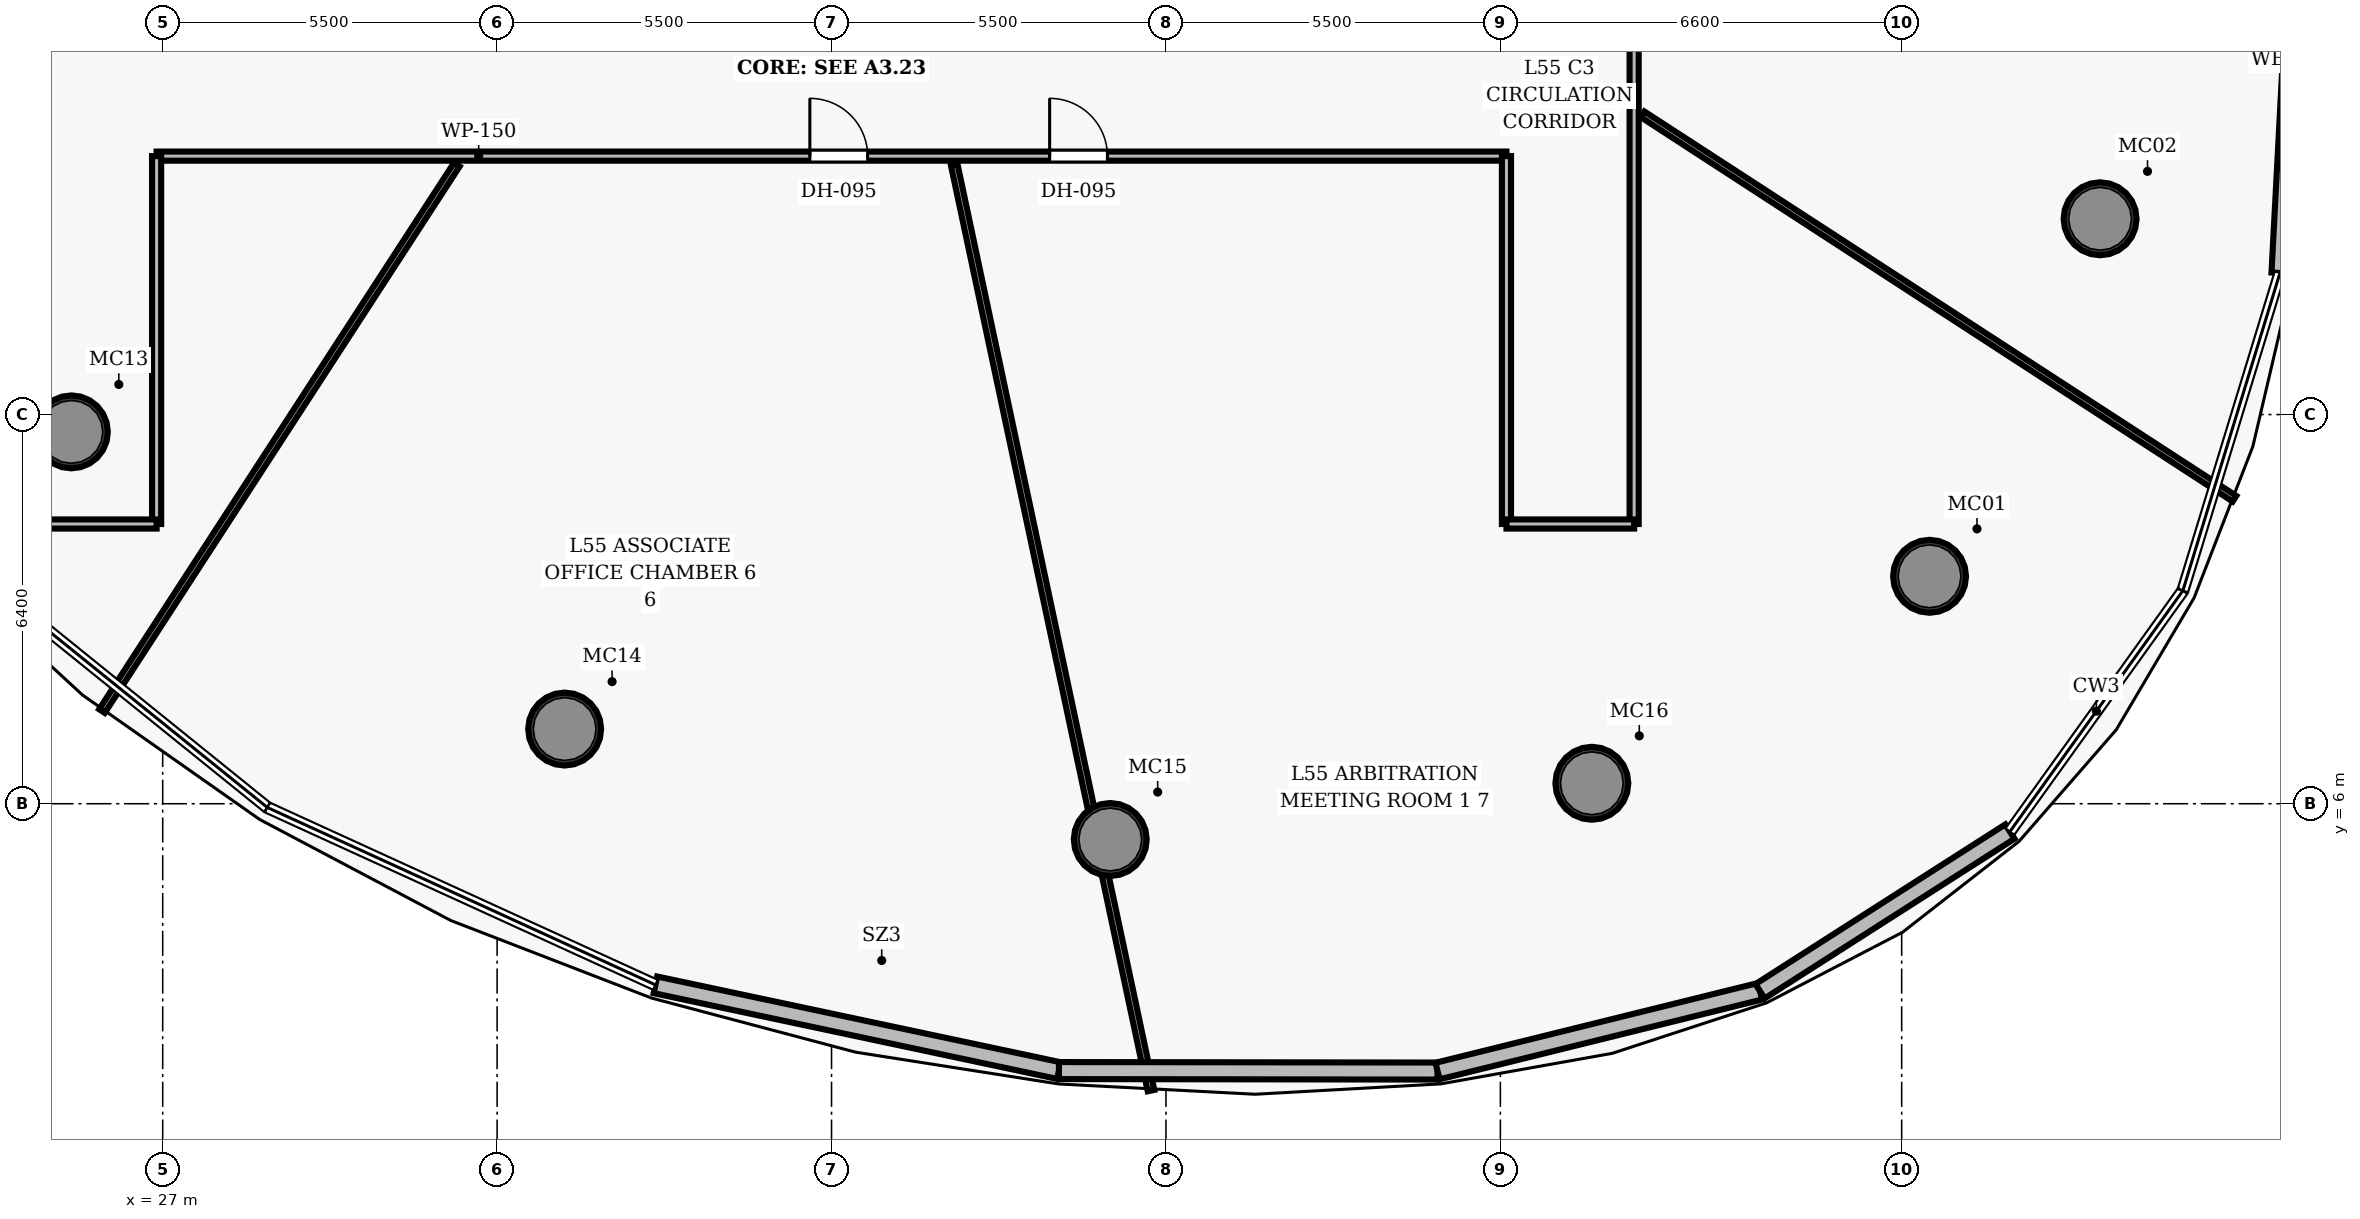
"""IFC4 building model, lengths in metres.
Left out: names, types, materials, properties, quantities, classifications, styles, units other than length and angle.
Written with IfcOpenShell. Run it as: python <this file> out.ifc"""

import sys

from ifc_helpers import new_model, si_unit, direction, frame, frame_2d, origin, origin_2d, place, context, subcontext, project, spatial, rectangle, hollow_circle, extrude, element, fill, save


model = new_model("IFC4")
c1 = context("Model", 3, precision=1e-05, world=origin(), true_north=direction((0.0, 1.0)))
c2 = subcontext(c1, "Body", "Model", "MODEL_VIEW")
j1 = project(units=[si_unit("LENGTHUNIT", "METRE"), si_unit("PLANEANGLEUNIT", "RADIAN")], contexts=[c1])
p1 = place(None, origin())
s1 = spatial("IfcSite", under=j1, at=p1, CompositionType="ELEMENT")
p2 = place(p1, origin())
s2 = spatial("IfcBuilding", under=s1, at=p2, CompositionType="ELEMENT")
p3 = place(p2, frame((0.0, 0.0, 217.4)))
s3 = spatial("IfcBuildingStorey", under=s2, at=p3, CompositionType="ELEMENT", Elevation=217.4)
for number, where, z_axis, x_axis in (
    (1, (56.058, 9.74, 0.0), (0.0, 0.0, 1.0), (1.0, 0.0, 0.0)),
    (2, (58.863, 15.619, 0.0), (0.0, 0.0, 1.0), (1.0, 0.0, 0.0)),
    (3, (25.498, 12.115, 0.0), (0.0, 0.0, 1.0), (1.0, 0.0, 0.0)),
    (4, (33.611, 7.228, 0.0), (0.0, 0.0, 1.0), (1.0, 0.0, 0.0)),
    (5, (42.584, 5.412, 0.0), (0.0, 0.0, 1.0), (1.0, 0.0, 0.0)),
    (6, (50.504, 6.336, 0.0), (0.0, 0.0, 1.0), (1.0, 0.0, 0.0)),
):
    element("IfcColumn", number, at=place(p3, frame(where, z_axis=z_axis, x_axis=x_axis)), inside=s3, PredefinedType="COLUMN", context=c2, shape_type="SweptSolid", body=[
        extrude(hollow_circle(Radius=0.6, WallThickness=0.05, at=origin_2d()), origin(), (0.0, 0.0, 1.0), 3.85),
    ])
p4 = place(p3, frame((26.9, 16.65, 0.0), z_axis=(0.0, 0.0, 1.0), x_axis=(1.0, 0.0, 0.0)))
e7 = element("IfcWall", 7, at=p4, inside=s3, PredefinedType="PARTITIONING", context=c2, shape_type="SweptSolid", body=[
    extrude(rectangle(XDim=22.2, YDim=0.15, at=frame_2d((11.1, 0.0))), origin(), (0.0, 0.0, 1.0), 3.035),
])
p5 = place(p4, frame((10.744, 0.0, 0.0)))
e8 = element("IfcOpeningElement", 8, at=p5, cuts=e7, PredefinedType="OPENING", context=c2, shape_type="SweptSolid", body=[
    extrude(rectangle(XDim=0.95, YDim=2.15, at=frame_2d((0.475, 1.075))), frame((0.0, 0.085, 0.0), z_axis=(0.0, -1.0, 0.0), x_axis=(1.0, 0.0, 0.0)), (0.0, 0.0, 1.0), 0.17),
])
p6 = place(p4, frame((14.687, 0.0, 0.0)))
e9 = element("IfcOpeningElement", 9, at=p6, cuts=e7, PredefinedType="OPENING", context=c2, shape_type="SweptSolid", body=[
    extrude(rectangle(XDim=0.95, YDim=2.15, at=frame_2d((0.475, 1.075))), frame((0.0, 0.085, 0.0), z_axis=(0.0, -1.0, 0.0), x_axis=(1.0, 0.0, 0.0)), (0.0, 0.0, 1.0), 0.17),
])
p7 = place(p3, frame((26.9, 10.6, 0.0), z_axis=(0.0, 0.0, 1.0), x_axis=(0.0, 1.0, 0.0)))
e10 = element("IfcWall", 10, at=p7, inside=s3, PredefinedType="PARTITIONING", context=c2, shape_type="SweptSolid", body=[
    extrude(rectangle(XDim=6.05, YDim=0.15, at=frame_2d((3.025, 0.0))), origin(), (0.0, 0.0, 1.0), 3.035),
])
p8 = place(p3, frame((24.8, 10.6, 0.0), z_axis=(0.0, 0.0, 1.0), x_axis=(1.0, 0.0, 0.0)))
e11 = element("IfcWall", 11, at=p8, inside=s3, PredefinedType="PARTITIONING", context=c2, shape_type="SweptSolid", body=[
    extrude(rectangle(XDim=2.1, YDim=0.15, at=frame_2d((1.05, 0.0))), origin(), (0.0, 0.0, 1.0), 3.035),
])
p9 = place(p3, frame((51.2, 10.6, 0.0), z_axis=(0.0, 0.0, 1.0), x_axis=(0.0, 1.0, 0.0)))
e12 = element("IfcWall", 12, at=p9, inside=s3, PredefinedType="PARTITIONING", context=c2, shape_type="SweptSolid", body=[
    extrude(rectangle(XDim=30.8, YDim=0.15, at=frame_2d((15.4, 0.0))), origin(), (0.0, 0.0, 1.0), 3.035),
])
p10 = place(p9, frame((21.962, 0.0, 0.0)))
e13 = element("IfcOpeningElement", 13, at=p10, cuts=e12, PredefinedType="OPENING", context=c2, shape_type="SweptSolid", body=[
    extrude(rectangle(XDim=0.95, YDim=2.15, at=frame_2d((0.475, 1.075))), frame((0.0, 0.085, 0.0), z_axis=(0.0, -1.0, 0.0), x_axis=(1.0, 0.0, 0.0)), (0.0, 0.0, 1.0), 0.17),
])
p11 = place(p9, frame((8.992, 0.0, 0.0)))
e14 = element("IfcOpeningElement", 14, at=p11, cuts=e12, PredefinedType="OPENING", context=c2, shape_type="SweptSolid", body=[
    extrude(rectangle(XDim=0.95, YDim=2.15, at=frame_2d((0.475, 1.075))), frame((0.0, 0.085, 0.0), z_axis=(0.0, -1.0, 0.0), x_axis=(1.0, 0.0, 0.0)), (0.0, 0.0, 1.0), 0.17),
])
p12 = place(p3, frame((49.1, 10.6, 0.0), z_axis=(0.0, 0.0, 1.0), x_axis=(0.0, 1.0, 0.0)))
e15 = element("IfcWall", 15, at=p12, inside=s3, PredefinedType="PARTITIONING", context=c2, shape_type="SweptSolid", body=[
    extrude(rectangle(XDim=6.05, YDim=0.15, at=frame_2d((3.025, 0.0))), origin(), (0.0, 0.0, 1.0), 3.035),
])
p13 = place(p3, frame((49.1, 10.6, 0.0), z_axis=(0.0, 0.0, 1.0), x_axis=(1.0, 0.0, 0.0)))
e16 = element("IfcWall", 16, at=p13, inside=s3, PredefinedType="PARTITIONING", context=c2, shape_type="SweptSolid", body=[
    extrude(rectangle(XDim=2.1, YDim=0.15, at=frame_2d((1.05, 0.0))), origin(), (0.0, 0.0, 1.0), 3.035),
])
p14 = place(p3, frame((31.837, 16.51, 0.0), z_axis=(0.0, 0.0, 1.0), x_axis=(-0.54464873575, -0.838664268135, 0.0)))
e17 = element("IfcWall", 17, at=p14, inside=s3, PredefinedType="PARTITIONING", context=c2, shape_type="SweptSolid", body=[
    extrude(rectangle(XDim=10.715, YDim=0.11, at=frame_2d((5.357, 0.0))), origin(), (0.0, 0.0, 1.0), 3.035),
])
p15 = place(p3, frame((40.017, 16.51, 0.0), z_axis=(0.0, 0.0, 1.0), x_axis=(0.207911646141, -0.97814761023, 0.0)))
e18 = element("IfcWall", 18, at=p15, inside=s3, PredefinedType="PARTITIONING", context=c2, shape_type="SweptSolid", body=[
    extrude(rectangle(XDim=15.568, YDim=0.11, at=frame_2d((7.784, 0.0))), origin(), (0.0, 0.0, 1.0), 3.035),
])
p16 = place(p3, frame((51.34, 17.337, 0.0), z_axis=(0.0, 0.0, 1.0), x_axis=(0.838666550767, -0.544645220877, 0.0)))
e19 = element("IfcWall", 19, at=p16, inside=s3, PredefinedType="PARTITIONING", context=c2, shape_type="SweptSolid", body=[
    extrude(rectangle(XDim=11.606, YDim=0.11, at=frame_2d((5.803, 0.0))), origin(), (0.0, 0.0, 1.0), 3.035),
])
p17 = place(p3, frame((62.151, 20.946, 0.0), z_axis=(0.0, 0.0, 1.0), x_axis=(-0.052818148449, -0.998604147395, 0.0)))
e20 = element("IfcWall", 20, at=p17, inside=s3, PredefinedType="SOLIDWALL", context=c2, shape_type="SweptSolid", body=[
    extrude(rectangle(XDim=6.226, YDim=0.28, at=frame_2d((3.113, 0.0))), origin(), (0.0, 0.0, 1.0), 3.62),
])
p18 = place(p3, frame((41.74, 1.611, 0.0), z_axis=(0.0, 0.0, 1.0), x_axis=(-0.978160131295, 0.207852730423, 0.0)))
e21 = element("IfcWall", 21, at=p18, inside=s3, PredefinedType="SOLIDWALL", context=c2, shape_type="SweptSolid", body=[
    extrude(rectangle(XDim=6.784, YDim=0.28, at=frame_2d((3.392, 0.0))), origin(), (0.0, 0.0, 1.0), 3.62),
])
p19 = place(p3, frame((47.967, 1.604, 0.0), z_axis=(0.0, 0.0, 1.0), x_axis=(-0.999999261228, 0.001215542371, 0.0)))
e22 = element("IfcWall", 22, at=p19, inside=s3, PredefinedType="SOLIDWALL", context=c2, shape_type="SweptSolid", body=[
    extrude(rectangle(XDim=6.226, YDim=0.28, at=frame_2d((3.113, 0.0))), origin(), (0.0, 0.0, 1.0), 3.62),
])
p20 = place(p3, frame((53.271, 2.916, 0.0), z_axis=(0.0, 0.0, 1.0), x_axis=(-0.970738734946, -0.240138102924, 0.0)))
e23 = element("IfcWall", 23, at=p20, inside=s3, PredefinedType="SOLIDWALL", context=c2, shape_type="SweptSolid", body=[
    extrude(rectangle(XDim=5.465, YDim=0.28, at=frame_2d((2.732, 0.0))), origin(), (0.0, 0.0, 1.0), 3.62),
])
p21 = place(p3, frame((57.38, 5.542, 0.0), z_axis=(0.0, 0.0, 1.0), x_axis=(-0.842602227984, -0.538536429033, 0.0)))
e24 = element("IfcWall", 24, at=p21, inside=s3, PredefinedType="SOLIDWALL", context=c2, shape_type="SweptSolid", body=[
    extrude(rectangle(XDim=4.876, YDim=0.28, at=frame_2d((2.438, 0.0))), origin(), (0.0, 0.0, 1.0), 3.62),
])
p22 = place(p5, origin())
e25 = element("IfcDoor", 25, at=p22, inside=s3, OperationType="SINGLE_SWING_LEFT", PredefinedType="DOOR", context=c2, shape_type="SweptSolid", body=[
    extrude(rectangle(XDim=0.95, YDim=2.15, at=frame_2d((0.475, 1.075))), frame((0.0, 0.025, 0.0), z_axis=(0.0, -1.0, 0.0), x_axis=(1.0, 0.0, 0.0)), (0.0, 0.0, 1.0), 0.05),
])
fill(e8, e25)
p23 = place(p6, origin())
e26 = element("IfcDoor", 26, at=p23, inside=s3, OperationType="SINGLE_SWING_LEFT", PredefinedType="DOOR", context=c2, shape_type="SweptSolid", body=[
    extrude(rectangle(XDim=0.95, YDim=2.15, at=frame_2d((0.475, 1.075))), frame((0.0, 0.025, 0.0), z_axis=(0.0, -1.0, 0.0), x_axis=(1.0, 0.0, 0.0)), (0.0, 0.0, 1.0), 0.05),
])
fill(e9, e26)
save(model, sys.argv[1])
